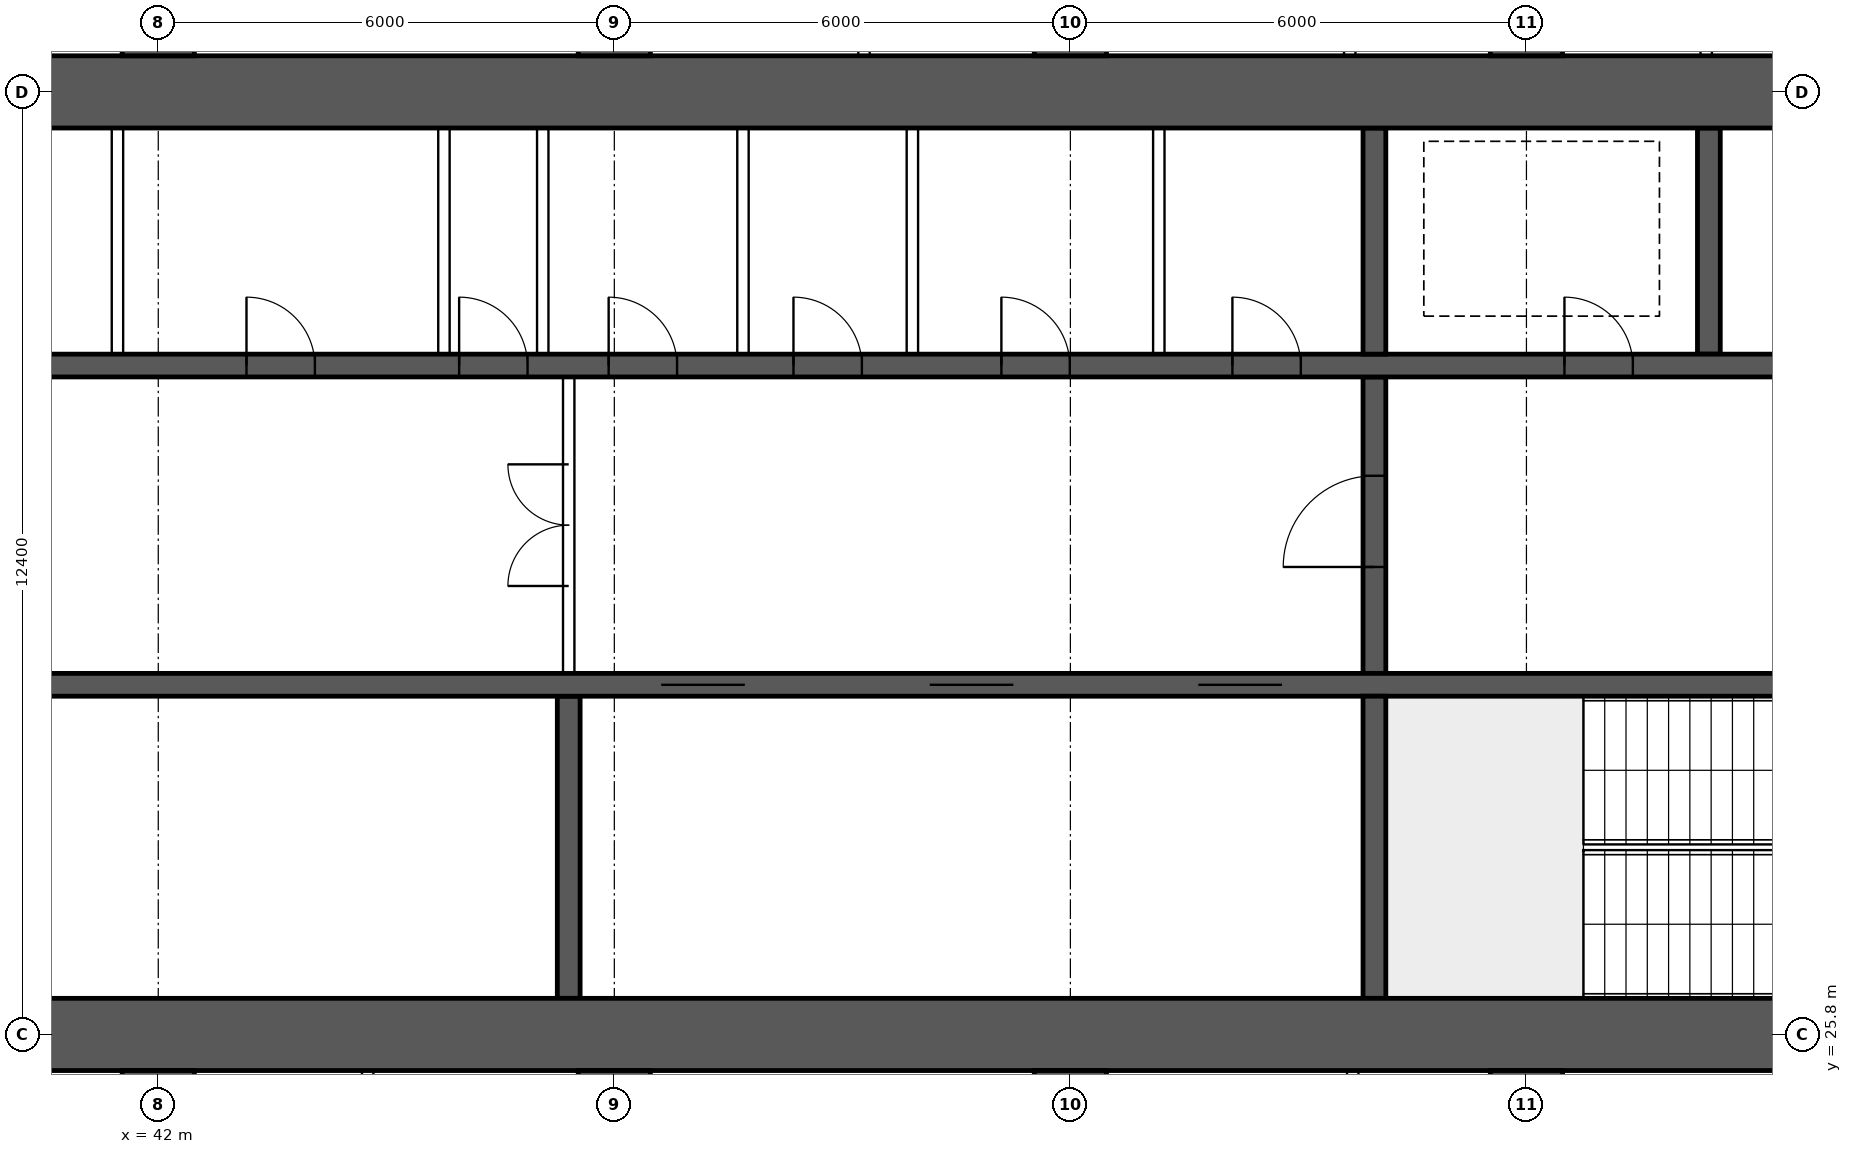
"""IFC4 building model, lengths in metres.
Left out: names, types, materials, properties, quantities, classifications, styles, units other than length and angle.
Written with IfcOpenShell. Run it as: python <this file> out.ifc"""

import sys

from ifc_helpers import new_model, si_unit, direction, frame, frame_2d, origin, place, context, subcontext, project, spatial, rectangle, extrude, element, fill, save


model = new_model("IFC4")
c1 = context("Model", 3, precision=1e-05, world=origin(), true_north=direction((0.0, 1.0)))
c2 = subcontext(c1, "Body", "Model", "MODEL_VIEW")
j1 = project(units=[si_unit("LENGTHUNIT", "METRE"), si_unit("PLANEANGLEUNIT", "RADIAN")], contexts=[c1])
p1 = place(None, origin())
s1 = spatial("IfcSite", under=j1, at=p1, CompositionType="ELEMENT")
p2 = place(p1, origin())
s2 = spatial("IfcBuilding", under=s1, at=p2, CompositionType="ELEMENT")
p3 = place(p2, frame((0.0, 0.0, 80.65)))
s3 = spatial("IfcBuildingStorey", under=s2, at=p3, CompositionType="ELEMENT", Elevation=80.65)
for number, where, z_axis, x_axis in (
    (1, (18.0, 25.8, 0.0), (0.0, 0.0, 1.0), (1.0, 0.0, 0.0)),
    (2, (18.0, 38.2, 0.0), (0.0, 0.0, 1.0), (1.0, 0.0, 0.0)),
):
    element("IfcWall", number, at=place(p3, frame(where, z_axis=z_axis, x_axis=x_axis)), inside=s3, PredefinedType="SHEAR", context=c2, shape_type="SweptSolid", body=[
        extrude(rectangle(XDim=48.0, YDim=0.95, at=frame_2d((24.0, 0.0))), origin(), (0.0, 0.0, 1.0), 3.75),
    ])
p4 = place(p3, frame((18.475, 30.4, 0.0), z_axis=(0.0, 0.0, 1.0), x_axis=(1.0, 0.0, 0.0)))
e3 = element("IfcWall", 3, at=p4, inside=s3, PredefinedType="SHEAR", context=c2, shape_type="SweptSolid", body=[
    extrude(rectangle(XDim=47.05, YDim=0.3, at=frame_2d((23.525, 0.0))), origin(), (0.0, 0.0, 1.0), 3.75),
])
p5 = place(p4, frame((0.4, 0.0, 0.0)))
e4 = element("IfcOpeningElement", 4, at=p5, cuts=e3, PredefinedType="OPENING", context=c2, shape_type="SweptSolid", body=[
    extrude(rectangle(XDim=1.0, YDim=2.1, at=frame_2d((0.5, 1.05))), frame((0.0, 0.16, 0.0), z_axis=(0.0, -1.0, 0.0), x_axis=(1.0, 0.0, 0.0)), (0.0, 0.0, 1.0), 0.32),
])
p6 = place(p4, frame((45.65, 0.0, 0.0)))
e5 = element("IfcOpeningElement", 5, at=p6, cuts=e3, PredefinedType="OPENING", context=c2, shape_type="SweptSolid", body=[
    extrude(rectangle(XDim=1.0, YDim=2.1, at=frame_2d((0.5, 1.05))), frame((0.0, 0.16, 0.0), z_axis=(0.0, -1.0, 0.0), x_axis=(1.0, 0.0, 0.0)), (0.0, 0.0, 1.0), 0.32),
])
p7 = place(p4, frame((8.275, 0.0, 0.0)))
e6 = element("IfcOpeningElement", 6, at=p7, cuts=e3, PredefinedType="OPENING", context=c2, shape_type="SweptSolid", body=[
    extrude(rectangle(XDim=1.1, YDim=2.1, at=frame_2d((0.55, 1.05))), frame((0.0, 0.16, 0.0), z_axis=(0.0, -1.0, 0.0), x_axis=(1.0, 0.0, 0.0)), (0.0, 0.0, 1.0), 0.32),
])
p8 = place(p4, frame((10.875, 0.0, 0.0)))
e7 = element("IfcOpeningElement", 7, at=p8, cuts=e3, PredefinedType="OPENING", context=c2, shape_type="SweptSolid", body=[
    extrude(rectangle(XDim=1.1, YDim=2.1, at=frame_2d((0.55, 1.05))), frame((0.0, 0.16, 0.0), z_axis=(0.0, -1.0, 0.0), x_axis=(1.0, 0.0, 0.0)), (0.0, 0.0, 1.0), 0.32),
])
p9 = place(p4, frame((13.475, 0.0, 0.0)))
e8 = element("IfcOpeningElement", 8, at=p9, cuts=e3, PredefinedType="OPENING", context=c2, shape_type="SweptSolid", body=[
    extrude(rectangle(XDim=1.1, YDim=2.1, at=frame_2d((0.55, 1.05))), frame((0.0, 0.16, 0.0), z_axis=(0.0, -1.0, 0.0), x_axis=(1.0, 0.0, 0.0)), (0.0, 0.0, 1.0), 0.32),
])
p10 = place(p4, frame((16.075, 0.0, 0.0)))
e9 = element("IfcOpeningElement", 9, at=p10, cuts=e3, PredefinedType="OPENING", context=c2, shape_type="SweptSolid", body=[
    extrude(rectangle(XDim=1.1, YDim=2.1, at=frame_2d((0.55, 1.05))), frame((0.0, 0.16, 0.0), z_axis=(0.0, -1.0, 0.0), x_axis=(1.0, 0.0, 0.0)), (0.0, 0.0, 1.0), 0.32),
])
p11 = place(p4, frame((30.142, 0.0, 0.0)))
e10 = element("IfcOpeningElement", 10, at=p11, cuts=e3, PredefinedType="OPENING", context=c2, shape_type="SweptSolid", body=[
    extrude(rectangle(XDim=1.1, YDim=2.1, at=frame_2d((0.55, 1.05))), frame((0.0, 0.16, 0.0), z_axis=(0.0, -1.0, 0.0), x_axis=(1.0, 0.0, 0.0)), (0.0, 0.0, 1.0), 0.32),
])
p12 = place(p4, frame((33.675, 0.0, 0.0)))
e11 = element("IfcOpeningElement", 11, at=p12, cuts=e3, PredefinedType="OPENING", context=c2, shape_type="SweptSolid", body=[
    extrude(rectangle(XDim=1.1, YDim=2.1, at=frame_2d((0.55, 1.05))), frame((0.0, 0.16, 0.0), z_axis=(0.0, -1.0, 0.0), x_axis=(1.0, 0.0, 0.0)), (0.0, 0.0, 1.0), 0.32),
])
p13 = place(p4, frame((37.208, 0.0, 0.0)))
e12 = element("IfcOpeningElement", 12, at=p13, cuts=e3, PredefinedType="OPENING", context=c2, shape_type="SweptSolid", body=[
    extrude(rectangle(XDim=1.1, YDim=2.1, at=frame_2d((0.55, 1.05))), frame((0.0, 0.16, 0.0), z_axis=(0.0, -1.0, 0.0), x_axis=(1.0, 0.0, 0.0)), (0.0, 0.0, 1.0), 0.32),
])
p14 = place(p3, frame((18.475, 34.6, 0.0), z_axis=(0.0, 0.0, 1.0), x_axis=(1.0, 0.0, 0.0)))
e13 = element("IfcWall", 13, at=p14, inside=s3, PredefinedType="SHEAR", context=c2, shape_type="SweptSolid", body=[
    extrude(rectangle(XDim=47.05, YDim=0.3, at=frame_2d((23.525, 0.0))), origin(), (0.0, 0.0, 1.0), 3.75),
])
p15 = place(p14, frame((0.9, 0.0, 0.0)))
e14 = element("IfcOpeningElement", 14, at=p15, cuts=e13, PredefinedType="OPENING", context=c2, shape_type="SweptSolid", body=[
    extrude(rectangle(XDim=1.1, YDim=2.1, at=frame_2d((0.55, 1.05))), frame((0.0, 0.16, 0.0), z_axis=(0.0, -1.0, 0.0), x_axis=(1.0, 0.0, 0.0)), (0.0, 0.0, 1.0), 0.32),
])
p16 = place(p14, frame((45.05, 0.0, 0.0)))
e15 = element("IfcOpeningElement", 15, at=p16, cuts=e13, PredefinedType="OPENING", context=c2, shape_type="SweptSolid", body=[
    extrude(rectangle(XDim=1.1, YDim=2.1, at=frame_2d((0.55, 1.05))), frame((0.0, 0.16, 0.0), z_axis=(0.0, -1.0, 0.0), x_axis=(1.0, 0.0, 0.0)), (0.0, 0.0, 1.0), 0.32),
])
p17 = place(p14, frame((4.125, 0.0, 0.0)))
e16 = element("IfcOpeningElement", 16, at=p17, cuts=e13, PredefinedType="OPENING", context=c2, shape_type="SweptSolid", body=[
    extrude(rectangle(XDim=0.9, YDim=2.1, at=frame_2d((0.45, 1.05))), frame((0.0, 0.16, 0.0), z_axis=(0.0, -1.0, 0.0), x_axis=(1.0, 0.0, 0.0)), (0.0, 0.0, 1.0), 0.32),
])
p18 = place(p14, frame((42.025, 0.0, 0.0)))
e17 = element("IfcOpeningElement", 17, at=p18, cuts=e13, PredefinedType="OPENING", context=c2, shape_type="SweptSolid", body=[
    extrude(rectangle(XDim=0.9, YDim=2.1, at=frame_2d((0.45, 1.05))), frame((0.0, 0.16, 0.0), z_axis=(0.0, -1.0, 0.0), x_axis=(1.0, 0.0, 0.0)), (0.0, 0.0, 1.0), 0.32),
])
p19 = place(p14, frame((8.9, 0.0, 0.0)))
e18 = element("IfcOpeningElement", 18, at=p19, cuts=e13, PredefinedType="OPENING", context=c2, shape_type="SweptSolid", body=[
    extrude(rectangle(XDim=0.9, YDim=2.1, at=frame_2d((0.45, 1.05))), frame((0.0, 0.16, 0.0), z_axis=(0.0, -1.0, 0.0), x_axis=(1.0, 0.0, 0.0)), (0.0, 0.0, 1.0), 0.32),
])
p20 = place(p14, frame((12.874, 0.0, 0.0)))
e19 = element("IfcOpeningElement", 19, at=p20, cuts=e13, PredefinedType="OPENING", context=c2, shape_type="SweptSolid", body=[
    extrude(rectangle(XDim=0.9, YDim=2.1, at=frame_2d((0.45, 1.05))), frame((0.0, 0.16, 0.0), z_axis=(0.0, -1.0, 0.0), x_axis=(1.0, 0.0, 0.0)), (0.0, 0.0, 1.0), 0.32),
])
p21 = place(p14, frame((16.521, 0.0, 0.0)))
e20 = element("IfcOpeningElement", 20, at=p21, cuts=e13, PredefinedType="OPENING", context=c2, shape_type="SweptSolid", body=[
    extrude(rectangle(XDim=0.9, YDim=2.1, at=frame_2d((0.45, 1.05))), frame((0.0, 0.16, 0.0), z_axis=(0.0, -1.0, 0.0), x_axis=(1.0, 0.0, 0.0)), (0.0, 0.0, 1.0), 0.32),
])
p22 = place(p14, frame((20.28, 0.0, 0.0)))
e21 = element("IfcOpeningElement", 21, at=p22, cuts=e13, PredefinedType="OPENING", context=c2, shape_type="SweptSolid", body=[
    extrude(rectangle(XDim=0.9, YDim=2.1, at=frame_2d((0.45, 1.05))), frame((0.0, 0.16, 0.0), z_axis=(0.0, -1.0, 0.0), x_axis=(1.0, 0.0, 0.0)), (0.0, 0.0, 1.0), 0.32),
])
p23 = place(p14, frame((24.686, 0.0, 0.0)))
e22 = element("IfcOpeningElement", 22, at=p23, cuts=e13, PredefinedType="OPENING", context=c2, shape_type="SweptSolid", body=[
    extrude(rectangle(XDim=0.9, YDim=2.1, at=frame_2d((0.45, 1.05))), frame((0.0, 0.16, 0.0), z_axis=(0.0, -1.0, 0.0), x_axis=(1.0, 0.0, 0.0)), (0.0, 0.0, 1.0), 0.32),
])
p24 = place(p14, frame((27.483, 0.0, 0.0)))
e23 = element("IfcOpeningElement", 23, at=p24, cuts=e13, PredefinedType="OPENING", context=c2, shape_type="SweptSolid", body=[
    extrude(rectangle(XDim=0.9, YDim=2.1, at=frame_2d((0.45, 1.05))), frame((0.0, 0.16, 0.0), z_axis=(0.0, -1.0, 0.0), x_axis=(1.0, 0.0, 0.0)), (0.0, 0.0, 1.0), 0.32),
])
p25 = place(p14, frame((29.45, 0.0, 0.0)))
e24 = element("IfcOpeningElement", 24, at=p25, cuts=e13, PredefinedType="OPENING", context=c2, shape_type="SweptSolid", body=[
    extrude(rectangle(XDim=0.9, YDim=2.1, at=frame_2d((0.45, 1.05))), frame((0.0, 0.16, 0.0), z_axis=(0.0, -1.0, 0.0), x_axis=(1.0, 0.0, 0.0)), (0.0, 0.0, 1.0), 0.32),
])
p26 = place(p14, frame((31.882, 0.0, 0.0)))
e25 = element("IfcOpeningElement", 25, at=p26, cuts=e13, PredefinedType="OPENING", context=c2, shape_type="SweptSolid", body=[
    extrude(rectangle(XDim=0.9, YDim=2.1, at=frame_2d((0.45, 1.05))), frame((0.0, 0.16, 0.0), z_axis=(0.0, -1.0, 0.0), x_axis=(1.0, 0.0, 0.0)), (0.0, 0.0, 1.0), 0.32),
])
p27 = place(p14, frame((34.617, 0.0, 0.0)))
e26 = element("IfcOpeningElement", 26, at=p27, cuts=e13, PredefinedType="OPENING", context=c2, shape_type="SweptSolid", body=[
    extrude(rectangle(XDim=0.9, YDim=2.1, at=frame_2d((0.45, 1.05))), frame((0.0, 0.16, 0.0), z_axis=(0.0, -1.0, 0.0), x_axis=(1.0, 0.0, 0.0)), (0.0, 0.0, 1.0), 0.32),
])
p28 = place(p14, frame((37.656, 0.0, 0.0)))
e27 = element("IfcOpeningElement", 27, at=p28, cuts=e13, PredefinedType="OPENING", context=c2, shape_type="SweptSolid", body=[
    extrude(rectangle(XDim=0.9, YDim=2.1, at=frame_2d((0.45, 1.05))), frame((0.0, 0.16, 0.0), z_axis=(0.0, -1.0, 0.0), x_axis=(1.0, 0.0, 0.0)), (0.0, 0.0, 1.0), 0.32),
])
p29 = place(p3, frame((58.0, 26.275, 0.0), z_axis=(0.0, 0.0, 1.0), x_axis=(0.0, 1.0, 0.0)))
e28 = element("IfcWall", 28, at=p29, inside=s3, PredefinedType="SHEAR", context=c2, shape_type="SweptSolid", body=[
    extrude(rectangle(XDim=3.975, YDim=0.3, at=frame_2d((1.988, 0.0))), origin(), (0.0, 0.0, 1.0), 3.75),
])
p30 = place(p3, frame((58.0, 30.55, 0.0), z_axis=(0.0, 0.0, 1.0), x_axis=(0.0, 1.0, 0.0)))
e29 = element("IfcWall", 29, at=p30, inside=s3, PredefinedType="SHEAR", context=c2, shape_type="SweptSolid", body=[
    extrude(rectangle(XDim=3.9, YDim=0.3, at=frame_2d((1.95, 0.0))), origin(), (0.0, 0.0, 1.0), 3.75),
])
p31 = place(p30, frame((1.4, 0.0, 0.0)))
e30 = element("IfcOpeningElement", 30, at=p31, cuts=e29, PredefinedType="OPENING", context=c2, shape_type="SweptSolid", body=[
    extrude(rectangle(XDim=1.2, YDim=2.1, at=frame_2d((0.6, 1.05))), frame((0.0, 0.16, 0.0), z_axis=(0.0, -1.0, 0.0), x_axis=(1.0, 0.0, 0.0)), (0.0, 0.0, 1.0), 0.32),
])
for number, where, z_axis, x_axis in (
    (31, (62.4, 34.75, 0.0), (0.0, 0.0, 1.0), (0.0, 1.0, 0.0)),
    (32, (58.0, 34.75, 0.0), (0.0, 0.0, 1.0), (0.0, 1.0, 0.0)),
):
    element("IfcWall", number, at=place(p3, frame(where, z_axis=z_axis, x_axis=x_axis)), inside=s3, PredefinedType="SHEAR", context=c2, shape_type="SweptSolid", body=[
        extrude(rectangle(XDim=2.975, YDim=0.3, at=frame_2d((1.488, 0.0))), origin(), (0.0, 0.0, 1.0), 3.75),
    ])
p32 = place(p3, frame((47.4, 26.275, 0.0), z_axis=(0.0, 0.0, 1.0), x_axis=(0.0, 1.0, 0.0)))
e33 = element("IfcWall", 33, at=p32, inside=s3, PredefinedType="SHEAR", context=c2, shape_type="SweptSolid", body=[
    extrude(rectangle(XDim=3.975, YDim=0.3, at=frame_2d((1.988, 0.0))), origin(), (0.0, 0.0, 1.0), 3.75),
])
for number, where, z_axis, x_axis in (
    (34, (42.0, 16.0, 0.0), (0.0, 0.0, 1.0), (0.0, 1.0, 0.0)),
    (35, (42.0, 38.675, 0.0), (0.0, 0.0, 1.0), (0.0, 1.0, 0.0)),
    (36, (48.0, 16.0, 0.0), (0.0, 0.0, 1.0), (0.0, 1.0, 0.0)),
    (37, (48.0, 38.675, 0.0), (0.0, 0.0, 1.0), (0.0, 1.0, 0.0)),
    (38, (54.0, 16.0, 0.0), (0.0, 0.0, 1.0), (0.0, 1.0, 0.0)),
    (39, (54.0, 38.675, 0.0), (0.0, 0.0, 1.0), (0.0, 1.0, 0.0)),
    (40, (60.0, 16.0, 0.0), (0.0, 0.0, 1.0), (0.0, 1.0, 0.0)),
    (41, (60.0, 38.675, 0.0), (0.0, 0.0, 1.0), (0.0, 1.0, 0.0)),
):
    element("IfcWall", number, at=place(p3, frame(where, z_axis=z_axis, x_axis=x_axis)), inside=s3, PredefinedType="SHEAR", context=c2, shape_type="SweptSolid", body=[
        extrude(rectangle(XDim=9.325, YDim=0.95, at=frame_2d((4.663, 0.0))), origin(), (0.0, 0.0, 1.0), 3.75),
    ])
p33 = place(p3, frame((47.4, 30.55, 0.0), z_axis=(0.0, 0.0, 1.0), x_axis=(0.0, 1.0, 0.0)))
e42 = element("IfcWall", 42, at=p33, inside=s3, PredefinedType="SOLIDWALL", context=c2, shape_type="SweptSolid", body=[
    extrude(rectangle(XDim=3.9, YDim=0.15, at=frame_2d((1.95, 0.0))), origin(), (0.0, 0.0, 1.0), 3.3),
])
p34 = place(p33, frame((1.15, 0.0, 0.0)))
e43 = element("IfcOpeningElement", 43, at=p34, cuts=e42, PredefinedType="OPENING", context=c2, shape_type="SweptSolid", body=[
    extrude(rectangle(XDim=1.6, YDim=2.1, at=frame_2d((0.8, 1.05))), frame((0.0, 0.085, 0.0), z_axis=(0.0, -1.0, 0.0), x_axis=(1.0, 0.0, 0.0)), (0.0, 0.0, 1.0), 0.17),
])
for number, where, z_axis, x_axis in (
    (44, (41.463, 34.75, 0.0), (0.0, 0.0, 1.0), (0.0, 1.0, 0.0)),
    (45, (45.758, 34.75, 0.0), (0.0, 0.0, 1.0), (0.0, 1.0, 0.0)),
    (46, (47.058, 34.75, 0.0), (0.0, 0.0, 1.0), (0.0, 1.0, 0.0)),
    (47, (49.692, 34.75, 0.0), (0.0, 0.0, 1.0), (0.0, 1.0, 0.0)),
    (48, (51.921, 34.75, 0.0), (0.0, 0.0, 1.0), (0.0, 1.0, 0.0)),
    (49, (55.163, 34.75, 0.0), (0.0, 0.0, 1.0), (0.0, 1.0, 0.0)),
):
    element("IfcWall", number, at=place(p3, frame(where, z_axis=z_axis, x_axis=x_axis)), inside=s3, PredefinedType="SOLIDWALL", context=c2, shape_type="SweptSolid", body=[
        extrude(rectangle(XDim=2.975, YDim=0.15, at=frame_2d((1.488, 0.0))), origin(), (0.0, 0.0, 1.0), 3.3),
    ])
for number, where, z_axis, x_axis in (
    (50, (44.755, 16.1, 0.0), (0.0, 0.0, 1.0), (0.0, 1.0, 0.0)),
    (51, (57.715, 16.1, 0.0), (0.0, 0.0, 1.0), (0.0, 1.0, 0.0)),
    (52, (51.285, 38.675, 0.0), (0.0, 0.0, 1.0), (0.0, 1.0, 0.0)),
    (53, (57.675, 38.675, 0.0), (0.0, 0.0, 1.0), (0.0, 1.0, 0.0)),
    (54, (62.365, 38.675, 0.0), (0.0, 0.0, 1.0), (0.0, 1.0, 0.0)),
):
    element("IfcWall", number, at=place(p3, frame(where, z_axis=z_axis, x_axis=x_axis)), inside=s3, PredefinedType="PARTITIONING", context=c2, shape_type="SweptSolid", body=[
        extrude(rectangle(XDim=9.225, YDim=0.15, at=frame_2d((4.612, 0.0))), origin(), (0.0, 0.0, 1.0), 3.3),
    ])
p35 = place(p34, origin())
e55 = element("IfcDoor", 55, at=p35, inside=s3, OperationType="DOUBLE_DOOR_SINGLE_SWING", PredefinedType="DOOR", context=c2, shape_type="SweptSolid", body=[
    extrude(rectangle(XDim=1.6, YDim=2.1, at=frame_2d((0.8, 1.05))), frame((0.0, 0.025, 0.0), z_axis=(0.0, -1.0, 0.0), x_axis=(1.0, 0.0, 0.0)), (0.0, 0.0, 1.0), 0.05),
])
fill(e43, e55)
p36 = place(p18, origin())
e56 = element("IfcDoor", 56, at=p36, inside=s3, OperationType="SINGLE_SWING_LEFT", PredefinedType="DOOR", context=c2, shape_type="SweptSolid", body=[
    extrude(rectangle(XDim=0.9, YDim=2.1, at=frame_2d((0.45, 1.05))), frame((0.0, 0.025, 0.0), z_axis=(0.0, -1.0, 0.0), x_axis=(1.0, 0.0, 0.0)), (0.0, 0.0, 1.0), 0.05),
])
fill(e17, e56)
p37 = place(p31, origin())
e57 = element("IfcDoor", 57, at=p37, inside=s3, OperationType="SINGLE_SWING_LEFT", PredefinedType="DOOR", context=c2, shape_type="SweptSolid", body=[
    extrude(rectangle(XDim=1.2, YDim=2.1, at=frame_2d((0.6, 1.05))), frame((0.0, 0.025, 0.0), z_axis=(0.0, -1.0, 0.0), x_axis=(1.0, 0.0, 0.0)), (0.0, 0.0, 1.0), 0.05),
])
fill(e30, e57)
p38 = place(p23, origin())
e58 = element("IfcDoor", 58, at=p38, inside=s3, OperationType="SINGLE_SWING_LEFT", PredefinedType="DOOR", context=c2, shape_type="SweptSolid", body=[
    extrude(rectangle(XDim=0.9, YDim=2.1, at=frame_2d((0.45, 1.05))), frame((0.0, 0.025, 0.0), z_axis=(0.0, -1.0, 0.0), x_axis=(1.0, 0.0, 0.0)), (0.0, 0.0, 1.0), 0.05),
])
fill(e22, e58)
p39 = place(p24, origin())
e59 = element("IfcDoor", 59, at=p39, inside=s3, OperationType="SINGLE_SWING_LEFT", PredefinedType="DOOR", context=c2, shape_type="SweptSolid", body=[
    extrude(rectangle(XDim=0.9, YDim=2.1, at=frame_2d((0.45, 1.05))), frame((0.0, 0.025, 0.0), z_axis=(0.0, -1.0, 0.0), x_axis=(1.0, 0.0, 0.0)), (0.0, 0.0, 1.0), 0.05),
])
fill(e23, e59)
p40 = place(p25, origin())
e60 = element("IfcDoor", 60, at=p40, inside=s3, OperationType="SINGLE_SWING_LEFT", PredefinedType="DOOR", context=c2, shape_type="SweptSolid", body=[
    extrude(rectangle(XDim=0.9, YDim=2.1, at=frame_2d((0.45, 1.05))), frame((0.0, 0.025, 0.0), z_axis=(0.0, -1.0, 0.0), x_axis=(1.0, 0.0, 0.0)), (0.0, 0.0, 1.0), 0.05),
])
fill(e24, e60)
p41 = place(p26, origin())
e61 = element("IfcDoor", 61, at=p41, inside=s3, OperationType="SINGLE_SWING_LEFT", PredefinedType="DOOR", context=c2, shape_type="SweptSolid", body=[
    extrude(rectangle(XDim=0.9, YDim=2.1, at=frame_2d((0.45, 1.05))), frame((0.0, 0.025, 0.0), z_axis=(0.0, -1.0, 0.0), x_axis=(1.0, 0.0, 0.0)), (0.0, 0.0, 1.0), 0.05),
])
fill(e25, e61)
p42 = place(p27, origin())
e62 = element("IfcDoor", 62, at=p42, inside=s3, OperationType="SINGLE_SWING_LEFT", PredefinedType="DOOR", context=c2, shape_type="SweptSolid", body=[
    extrude(rectangle(XDim=0.9, YDim=2.1, at=frame_2d((0.45, 1.05))), frame((0.0, 0.025, 0.0), z_axis=(0.0, -1.0, 0.0), x_axis=(1.0, 0.0, 0.0)), (0.0, 0.0, 1.0), 0.05),
])
fill(e26, e62)
p43 = place(p28, origin())
e63 = element("IfcDoor", 63, at=p43, inside=s3, OperationType="SINGLE_SWING_LEFT", PredefinedType="DOOR", context=c2, shape_type="SweptSolid", body=[
    extrude(rectangle(XDim=0.9, YDim=2.1, at=frame_2d((0.45, 1.05))), frame((0.0, 0.025, 0.0), z_axis=(0.0, -1.0, 0.0), x_axis=(1.0, 0.0, 0.0)), (0.0, 0.0, 1.0), 0.05),
])
fill(e27, e63)
p44 = place(p11, origin())
e64 = element("IfcDoor", 64, at=p44, inside=s3, OperationType="DOUBLE_DOOR_SLIDING", PredefinedType="DOOR", context=c2, shape_type="SweptSolid", body=[
    extrude(rectangle(XDim=1.1, YDim=2.1, at=frame_2d((0.55, 1.05))), frame((0.0, 0.025, 0.0), z_axis=(0.0, -1.0, 0.0), x_axis=(1.0, 0.0, 0.0)), (0.0, 0.0, 1.0), 0.05),
])
fill(e10, e64)
p45 = place(p12, origin())
e65 = element("IfcDoor", 65, at=p45, inside=s3, OperationType="DOUBLE_DOOR_SLIDING", PredefinedType="DOOR", context=c2, shape_type="SweptSolid", body=[
    extrude(rectangle(XDim=1.1, YDim=2.1, at=frame_2d((0.55, 1.05))), frame((0.0, 0.025, 0.0), z_axis=(0.0, -1.0, 0.0), x_axis=(1.0, 0.0, 0.0)), (0.0, 0.0, 1.0), 0.05),
])
fill(e11, e65)
p46 = place(p13, origin())
e66 = element("IfcDoor", 66, at=p46, inside=s3, OperationType="DOUBLE_DOOR_SLIDING", PredefinedType="DOOR", context=c2, shape_type="SweptSolid", body=[
    extrude(rectangle(XDim=1.1, YDim=2.1, at=frame_2d((0.55, 1.05))), frame((0.0, 0.025, 0.0), z_axis=(0.0, -1.0, 0.0), x_axis=(1.0, 0.0, 0.0)), (0.0, 0.0, 1.0), 0.05),
])
fill(e12, e66)
save(model, sys.argv[1])
